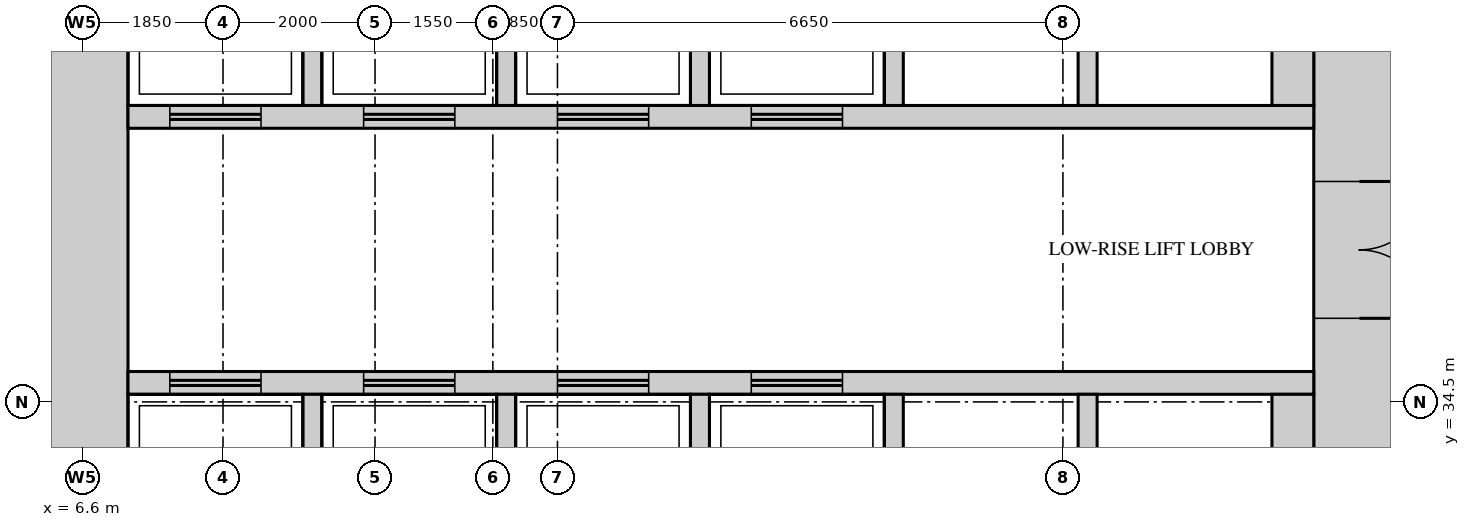
"""IFC4 building model, lengths in metres.
Left out: names, types, materials, properties, quantities, classifications, styles, units other than length and angle.
Written with IfcOpenShell. Run it as: python <this file> out.ifc"""

import sys

from ifc_helpers import new_model, si_unit, direction, frame, frame_2d, origin, place, context, subcontext, project, spatial, rectangle, extrude, source, transform, mapped, element, fill, save


model = new_model("IFC4")
c1 = context("Model", 3, precision=1e-05, world=origin(), true_north=direction((0.0, 1.0)))
c2 = subcontext(c1, "Body", "Model", "MODEL_VIEW")
j1 = project(units=[si_unit("LENGTHUNIT", "METRE"), si_unit("PLANEANGLEUNIT", "RADIAN")], contexts=[c1])
p1 = place(None, origin())
s1 = spatial("IfcSite", under=j1, at=p1, CompositionType="ELEMENT")
p2 = place(p1, origin())
s2 = spatial("IfcBuilding", under=s1, at=p2, CompositionType="ELEMENT")
p3 = place(p2, frame((0.0, 0.0, 73.5)))
s3 = spatial("IfcBuildingStorey", under=s2, at=p3, CompositionType="ELEMENT", Elevation=73.5)
m1 = source(origin(), c2, "Body", "SweptSolid", [
    extrude(rectangle(XDim=27.6, YDim=1.2, at=frame_2d((13.8, 0.0))), origin(), (0.0, 0.0, 1.0), 4.2),
])
p4 = place(p3, frame((23.4, 13.2, 0.0), z_axis=(0.0, 0.0, 1.0), x_axis=(0.0, 1.0, 0.0)))
e1 = element("IfcWall", 1, at=p4, inside=s3, PredefinedType="SHEAR", context=c2, shape_type="MappedRepresentation", body=[
    mapped(m1, transform((0.0, 0.0, 0.0))),
])
m2 = source(origin(), c2, "Body", "SweptSolid", [
    extrude(rectangle(XDim=1.8, YDim=2.1, at=frame_2d((0.9, 1.05))), frame((0.0, 0.61, 0.0), z_axis=(0.0, -1.0, 0.0), x_axis=(1.0, 0.0, 0.0)), (0.0, 0.0, 1.0), 1.22),
])
p5 = place(p4, frame((22.4, 0.0, 0.0)))
e2 = element("IfcOpeningElement", 2, at=p5, cuts=e1, PredefinedType="OPENING", context=c2, shape_type="MappedRepresentation", body=[
    mapped(m2, transform((0.0, 0.0, 0.0))),
])
m3 = source(origin(), c2, "Body", "SweptSolid", [
    extrude(rectangle(XDim=1.2, YDim=2.1, at=frame_2d((0.6, 1.05))), frame((0.0, 0.61, 0.0), z_axis=(0.0, -1.0, 0.0), x_axis=(1.0, 0.0, 0.0)), (0.0, 0.0, 1.0), 1.22),
])
p6 = place(p4, frame((14.4, 0.0, 0.0)))
e3 = element("IfcOpeningElement", 3, at=p6, cuts=e1, PredefinedType="OPENING", context=c2, shape_type="MappedRepresentation", body=[
    mapped(m3, transform((0.0, 0.0, 0.0))),
])
m4 = source(origin(), c2, "Body", "SweptSolid", [
    extrude(rectangle(XDim=0.9, YDim=2.1, at=frame_2d((0.45, 1.05))), frame((0.0, 0.61, 0.0), z_axis=(0.0, -1.0, 0.0), x_axis=(1.0, 0.0, 0.0)), (0.0, 0.0, 1.0), 1.22),
])
p7 = place(p4, frame((1.15, 0.0, 0.0)))
e4 = element("IfcOpeningElement", 4, at=p7, cuts=e1, PredefinedType="OPENING", context=c2, shape_type="MappedRepresentation", body=[
    mapped(m4, transform((0.0, 0.0, 0.0))),
])
p8 = place(p4, frame((6.0, 0.0, 0.0)))
e5 = element("IfcOpeningElement", 5, at=p8, cuts=e1, PredefinedType="OPENING", context=c2, shape_type="MappedRepresentation", body=[
    mapped(m4, transform((0.0, 0.0, 0.0))),
])
p9 = place(p3, frame((6.6, 13.2, 0.0), z_axis=(0.0, 0.0, 1.0), x_axis=(0.0, 1.0, 0.0)))
e6 = element("IfcWall", 6, at=p9, inside=s3, PredefinedType="SHEAR", context=c2, shape_type="MappedRepresentation", body=[
    mapped(m1, transform((0.0, 0.0, 0.0))),
])
m5 = source(origin(), c2, "Body", "SweptSolid", [
    extrude(rectangle(XDim=15.6, YDim=0.3, at=frame_2d((7.8, 0.0))), origin(), (0.0, 0.0, 1.0), 4.2),
])
p10 = place(p3, frame((7.2, 38.25, 0.0), z_axis=(0.0, 0.0, 1.0), x_axis=(1.0, 0.0, 0.0)))
e7 = element("IfcWall", 7, at=p10, inside=s3, PredefinedType="STANDARD", context=c2, shape_type="MappedRepresentation", body=[
    mapped(m5, transform((0.0, 0.0, 0.0))),
])
m6 = source(origin(), c2, "Body", "SweptSolid", [
    extrude(rectangle(XDim=1.2, YDim=2.1, at=frame_2d((0.6, 1.05))), frame((0.0, 0.16, 0.0), z_axis=(0.0, -1.0, 0.0), x_axis=(1.0, 0.0, 0.0)), (0.0, 0.0, 1.0), 0.32),
])
p11 = place(p10, frame((0.55, 0.0, 0.0)))
e8 = element("IfcOpeningElement", 8, at=p11, cuts=e7, PredefinedType="OPENING", context=c2, shape_type="MappedRepresentation", body=[
    mapped(m6, transform((0.0, 0.0, 0.0))),
])
p12 = place(p10, frame((3.1, 0.0, 0.0)))
e9 = element("IfcOpeningElement", 9, at=p12, cuts=e7, PredefinedType="OPENING", context=c2, shape_type="MappedRepresentation", body=[
    mapped(m6, transform((0.0, 0.0, 0.0))),
])
p13 = place(p10, frame((5.65, 0.0, 0.0)))
e10 = element("IfcOpeningElement", 10, at=p13, cuts=e7, PredefinedType="OPENING", context=c2, shape_type="MappedRepresentation", body=[
    mapped(m6, transform((0.0, 0.0, 0.0))),
])
p14 = place(p10, frame((8.2, 0.0, 0.0)))
e11 = element("IfcOpeningElement", 11, at=p14, cuts=e7, PredefinedType="OPENING", context=c2, shape_type="MappedRepresentation", body=[
    mapped(m6, transform((0.0, 0.0, 0.0))),
])
p15 = place(p3, frame((7.2, 34.75, 0.0), z_axis=(0.0, 0.0, 1.0), x_axis=(1.0, 0.0, 0.0)))
e12 = element("IfcWall", 12, at=p15, inside=s3, PredefinedType="STANDARD", context=c2, shape_type="MappedRepresentation", body=[
    mapped(m5, transform((0.0, 0.0, 0.0))),
])
p16 = place(p15, frame((0.55, 0.0, 0.0)))
e13 = element("IfcOpeningElement", 13, at=p16, cuts=e12, PredefinedType="OPENING", context=c2, shape_type="MappedRepresentation", body=[
    mapped(m6, transform((0.0, 0.0, 0.0))),
])
p17 = place(p15, frame((3.1, 0.0, 0.0)))
e14 = element("IfcOpeningElement", 14, at=p17, cuts=e12, PredefinedType="OPENING", context=c2, shape_type="MappedRepresentation", body=[
    mapped(m6, transform((0.0, 0.0, 0.0))),
])
p18 = place(p15, frame((5.65, 0.0, 0.0)))
e15 = element("IfcOpeningElement", 15, at=p18, cuts=e12, PredefinedType="OPENING", context=c2, shape_type="MappedRepresentation", body=[
    mapped(m6, transform((0.0, 0.0, 0.0))),
])
p19 = place(p15, frame((8.2, 0.0, 0.0)))
e16 = element("IfcOpeningElement", 16, at=p19, cuts=e12, PredefinedType="OPENING", context=c2, shape_type="MappedRepresentation", body=[
    mapped(m6, transform((0.0, 0.0, 0.0))),
])
m7 = source(origin(), c2, "Body", "SweptSolid", [
    extrude(rectangle(XDim=2.4, YDim=0.25, at=frame_2d((1.2, 0.0))), origin(), (0.0, 0.0, 1.0), 4.2),
])
for number, where, z_axis, x_axis in (
    (17, (9.625, 38.4, 0.0), (0.0, 0.0, 1.0), (0.0, 1.0, 0.0)),
    (18, (12.175, 38.4, 0.0), (0.0, 0.0, 1.0), (0.0, 1.0, 0.0)),
    (19, (14.725, 38.4, 0.0), (0.0, 0.0, 1.0), (0.0, 1.0, 0.0)),
    (20, (17.275, 38.4, 0.0), (0.0, 0.0, 1.0), (0.0, 1.0, 0.0)),
    (21, (19.825, 38.4, 0.0), (0.0, 0.0, 1.0), (0.0, 1.0, 0.0)),
):
    element("IfcWall", number, at=place(p3, frame(where, z_axis=z_axis, x_axis=x_axis)), inside=s3, PredefinedType="STANDARD", context=c2, shape_type="MappedRepresentation", body=[
        mapped(m7, transform((0.0, 0.0, 0.0))),
    ])
m8 = source(origin(), c2, "Body", "SweptSolid", [
    extrude(rectangle(XDim=2.4, YDim=0.55, at=frame_2d((1.2, 0.0))), origin(), (0.0, 0.0, 1.0), 4.2),
])
p20 = place(p3, frame((22.525, 38.4, 0.0), z_axis=(0.0, 0.0, 1.0), x_axis=(0.0, 1.0, 0.0)))
e22 = element("IfcWall", 22, at=p20, inside=s3, PredefinedType="STANDARD", context=c2, shape_type="MappedRepresentation", body=[
    mapped(m8, transform((0.0, 0.0, 0.0))),
])
for number, where, z_axis, x_axis in (
    (23, (9.625, 32.2, 0.0), (0.0, 0.0, 1.0), (0.0, 1.0, 0.0)),
    (24, (12.175, 32.2, 0.0), (0.0, 0.0, 1.0), (0.0, 1.0, 0.0)),
    (25, (14.725, 32.2, 0.0), (0.0, 0.0, 1.0), (0.0, 1.0, 0.0)),
    (26, (17.275, 32.2, 0.0), (0.0, 0.0, 1.0), (0.0, 1.0, 0.0)),
    (27, (19.825, 32.2, 0.0), (0.0, 0.0, 1.0), (0.0, 1.0, 0.0)),
):
    element("IfcWall", number, at=place(p3, frame(where, z_axis=z_axis, x_axis=x_axis)), inside=s3, PredefinedType="STANDARD", context=c2, shape_type="MappedRepresentation", body=[
        mapped(m7, transform((0.0, 0.0, 0.0))),
    ])
p21 = place(p3, frame((22.525, 32.2, 0.0), z_axis=(0.0, 0.0, 1.0), x_axis=(0.0, 1.0, 0.0)))
e28 = element("IfcWall", 28, at=p21, inside=s3, PredefinedType="STANDARD", context=c2, shape_type="MappedRepresentation", body=[
    mapped(m8, transform((0.0, 0.0, 0.0))),
])
m9 = source(origin(), c2, "Body", "SweptSolid", [
    extrude(rectangle(XDim=1.8, YDim=2.1, at=frame_2d((0.9, 1.05))), frame((0.0, 0.55, 0.0), z_axis=(0.0, -1.0, 0.0), x_axis=(1.0, 0.0, 0.0)), (0.0, 0.0, 1.0), 1.1),
])
p22 = place(p5, origin())
e29 = element("IfcDoor", 29, at=p22, inside=s3, OperationType="DOUBLE_DOOR_SINGLE_SWING", PredefinedType="DOOR", context=c2, shape_type="MappedRepresentation", body=[
    mapped(m9, transform((0.0, 0.0, 0.0))),
])
fill(e2, e29)
m10 = source(origin(), c2, "Body", "SweptSolid", [
    extrude(rectangle(XDim=1.2, YDim=2.1, at=frame_2d((0.6, 1.05))), frame((0.0, 0.025, 0.0), z_axis=(0.0, -1.0, 0.0), x_axis=(1.0, 0.0, 0.0)), (0.0, 0.0, 1.0), 0.05),
])
p23 = place(p16, origin())
e30 = element("IfcDoor", 30, at=p23, inside=s3, OperationType="DOUBLE_DOOR_SLIDING", PredefinedType="DOOR", context=c2, shape_type="MappedRepresentation", body=[
    mapped(m10, transform((0.0, 0.0, 0.0))),
])
fill(e13, e30)
p24 = place(p17, origin())
e31 = element("IfcDoor", 31, at=p24, inside=s3, OperationType="DOUBLE_DOOR_SLIDING", PredefinedType="DOOR", context=c2, shape_type="MappedRepresentation", body=[
    mapped(m10, transform((0.0, 0.0, 0.0))),
])
fill(e14, e31)
p25 = place(p18, origin())
e32 = element("IfcDoor", 32, at=p25, inside=s3, OperationType="DOUBLE_DOOR_SLIDING", PredefinedType="DOOR", context=c2, shape_type="MappedRepresentation", body=[
    mapped(m10, transform((0.0, 0.0, 0.0))),
])
fill(e15, e32)
p26 = place(p19, origin())
e33 = element("IfcDoor", 33, at=p26, inside=s3, OperationType="DOUBLE_DOOR_SLIDING", PredefinedType="DOOR", context=c2, shape_type="MappedRepresentation", body=[
    mapped(m10, transform((0.0, 0.0, 0.0))),
])
fill(e16, e33)
p27 = place(p11, origin())
e34 = element("IfcDoor", 34, at=p27, inside=s3, OperationType="DOUBLE_DOOR_SLIDING", PredefinedType="DOOR", context=c2, shape_type="MappedRepresentation", body=[
    mapped(m10, transform((0.0, 0.0, 0.0))),
])
fill(e8, e34)
p28 = place(p12, origin())
e35 = element("IfcDoor", 35, at=p28, inside=s3, OperationType="DOUBLE_DOOR_SLIDING", PredefinedType="DOOR", context=c2, shape_type="MappedRepresentation", body=[
    mapped(m10, transform((0.0, 0.0, 0.0))),
])
fill(e9, e35)
p29 = place(p13, origin())
e36 = element("IfcDoor", 36, at=p29, inside=s3, OperationType="DOUBLE_DOOR_SLIDING", PredefinedType="DOOR", context=c2, shape_type="MappedRepresentation", body=[
    mapped(m10, transform((0.0, 0.0, 0.0))),
])
fill(e10, e36)
p30 = place(p14, origin())
e37 = element("IfcDoor", 37, at=p30, inside=s3, OperationType="DOUBLE_DOOR_SLIDING", PredefinedType="DOOR", context=c2, shape_type="MappedRepresentation", body=[
    mapped(m10, transform((0.0, 0.0, 0.0))),
])
fill(e11, e37)
save(model, sys.argv[1])
